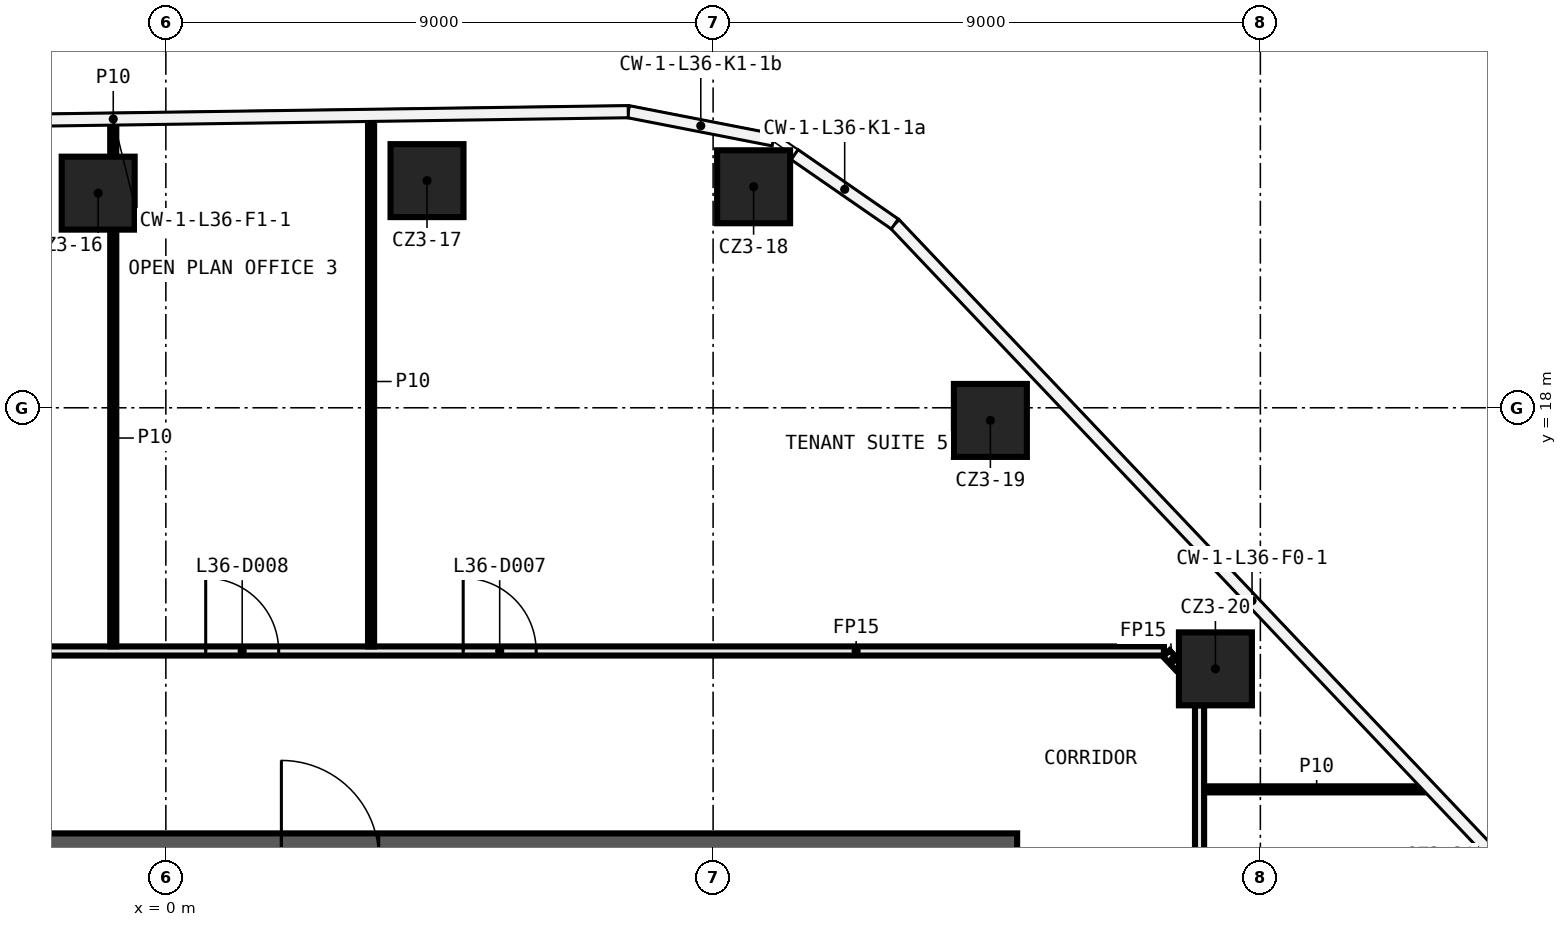
"""IFC4 building model, lengths in metres.
Left out: names, types, materials, properties, quantities, classifications, styles, units other than length and angle.
Written with IfcOpenShell. Run it as: python <this file> out.ifc"""

import sys

from ifc_helpers import new_model, si_unit, direction, frame, frame_2d, origin, origin_2d, place, context, subcontext, project, spatial, rectangle, extrude, element, fill, save


model = new_model("IFC4")
c1 = context("Model", 3, precision=1e-05, world=origin(), true_north=direction((0.0, 1.0)))
c2 = subcontext(c1, "Body", "Model", "MODEL_VIEW")
j1 = project(units=[si_unit("LENGTHUNIT", "METRE"), si_unit("PLANEANGLEUNIT", "RADIAN")], contexts=[c1])
p1 = place(None, origin())
s1 = spatial("IfcSite", under=j1, at=p1, CompositionType="ELEMENT")
p2 = place(p1, origin())
s2 = spatial("IfcBuilding", under=s1, at=p2, CompositionType="ELEMENT")
p3 = place(p2, frame((0.0, 0.0, 167.0)))
s3 = spatial("IfcBuildingStorey", under=s2, at=p3, CompositionType="ELEMENT", Elevation=167.0)
for number, where, z_axis, x_axis in (
    (1, (-1.113, 21.53, 0.0), (0.0, 0.0, 1.0), (1.0, 0.0, 0.0)),
    (2, (4.295, 21.736, 0.0), (0.0, 0.0, 1.0), (1.0, 0.0, 0.0)),
    (3, (9.666, 21.635, 0.0), (0.0, 0.0, 1.0), (1.0, 0.0, 0.0)),
    (4, (13.56, 17.792, 0.0), (0.0, 0.0, 1.0), (1.0, 0.0, 0.0)),
    (5, (17.261, 13.706, 0.0), (0.0, 0.0, 1.0), (1.0, 0.0, 0.0)),
):
    element("IfcColumn", number, at=place(p3, frame(where, z_axis=z_axis, x_axis=x_axis)), inside=s3, PredefinedType="COLUMN", context=c2, shape_type="SweptSolid", body=[
        extrude(rectangle(XDim=1.2, YDim=1.2, at=origin_2d()), origin(), (0.0, 0.0, 1.0), 3.82),
    ])
p4 = place(p3, frame((17.075, 11.724, 0.0), z_axis=(0.0, 0.0, 1.0), x_axis=(1.0, 0.0, 0.0)))
e6 = element("IfcWall", 6, at=p4, inside=s3, PredefinedType="PARTITIONING", context=c2, shape_type="SweptSolid", body=[
    extrude(rectangle(XDim=3.701, YDim=0.1, at=frame_2d((1.851, 0.0))), origin(), (0.0, 0.0, 1.0), 3.82),
])
p5 = place(p3, frame((-9.075, 14.0, 0.0), z_axis=(0.0, 0.0, 1.0), x_axis=(1.0, 0.0, 0.0)))
e7 = element("IfcWall", 7, at=p5, inside=s3, PredefinedType="PARTITIONING", context=c2, shape_type="SweptSolid", body=[
    extrude(rectangle(XDim=25.489, YDim=0.15, at=frame_2d((12.745, 0.0))), origin(), (0.0, 0.0, 1.0), 3.82),
])
p6 = place(p5, frame((13.965, 0.0, 0.0)))
e8 = element("IfcOpeningElement", 8, at=p6, cuts=e7, PredefinedType="OPENING", context=c2, shape_type="SweptSolid", body=[
    extrude(rectangle(XDim=1.2, YDim=2.1, at=frame_2d((0.6, 1.05))), frame((0.0, 0.085, 0.0), z_axis=(0.0, -1.0, 0.0), x_axis=(1.0, 0.0, 0.0)), (0.0, 0.0, 1.0), 0.17),
])
p7 = place(p5, frame((9.73, 0.0, 0.0)))
e9 = element("IfcOpeningElement", 9, at=p7, cuts=e7, PredefinedType="OPENING", context=c2, shape_type="SweptSolid", body=[
    extrude(rectangle(XDim=1.2, YDim=2.1, at=frame_2d((0.6, 1.05))), frame((0.0, 0.085, 0.0), z_axis=(0.0, -1.0, 0.0), x_axis=(1.0, 0.0, 0.0)), (0.0, 0.0, 1.0), 0.17),
])
p8 = place(p5, frame((5.49, 0.0, 0.0)))
e10 = element("IfcOpeningElement", 10, at=p8, cuts=e7, PredefinedType="OPENING", context=c2, shape_type="SweptSolid", body=[
    extrude(rectangle(XDim=1.2, YDim=2.1, at=frame_2d((0.6, 1.05))), frame((0.0, 0.085, 0.0), z_axis=(0.0, -1.0, 0.0), x_axis=(1.0, 0.0, 0.0)), (0.0, 0.0, 1.0), 0.17),
])
p9 = place(p3, frame((17.0, 13.106, 0.0), z_axis=(0.0, 0.0, 1.0), x_axis=(0.0, -1.0, 0.0)))
e11 = element("IfcWall", 11, at=p9, inside=s3, PredefinedType="PARTITIONING", context=c2, shape_type="SweptSolid", body=[
    extrude(rectangle(XDim=23.172, YDim=0.15, at=frame_2d((11.586, 0.0))), origin(), (0.0, 0.0, 1.0), 3.82),
])
p10 = place(p9, frame((11.492, 0.0, 0.0)))
e12 = element("IfcOpeningElement", 12, at=p10, cuts=e11, PredefinedType="OPENING", context=c2, shape_type="SweptSolid", body=[
    extrude(rectangle(XDim=1.2, YDim=2.1, at=frame_2d((0.6, 1.05))), frame((0.0, 0.085, 0.0), z_axis=(0.0, -1.0, 0.0), x_axis=(1.0, 0.0, 0.0)), (0.0, 0.0, 1.0), 0.17),
])
p11 = place(p9, frame((6.056, 0.0, 0.0)))
e13 = element("IfcOpeningElement", 13, at=p11, cuts=e11, PredefinedType="OPENING", context=c2, shape_type="SweptSolid", body=[
    extrude(rectangle(XDim=1.2, YDim=2.1, at=frame_2d((0.6, 1.05))), frame((0.0, 0.085, 0.0), z_axis=(0.0, -1.0, 0.0), x_axis=(1.0, 0.0, 0.0)), (0.0, 0.0, 1.0), 0.17),
])
p12 = place(p3, frame((3.375, 14.075, 0.0), z_axis=(0.0, 0.0, 1.0), x_axis=(0.0, 1.0, 0.0)))
e14 = element("IfcWall", 14, at=p12, inside=s3, PredefinedType="PARTITIONING", context=c2, shape_type="SweptSolid", body=[
    extrude(rectangle(XDim=8.715, YDim=0.1, at=frame_2d((4.357, 0.0))), origin(), (0.0, 0.0, 1.0), 3.82),
])
p13 = place(p3, frame((-0.865, 14.075, 0.0), z_axis=(0.0, 0.0, 1.0), x_axis=(0.0, 1.0, 0.0)))
e15 = element("IfcWall", 15, at=p13, inside=s3, PredefinedType="PARTITIONING", context=c2, shape_type="SweptSolid", body=[
    extrude(rectangle(XDim=6.855, YDim=0.1, at=frame_2d((3.427, 0.0))), origin(), (0.0, 0.0, 1.0), 3.82),
])
p14 = place(p3, frame((-0.865, 22.13, 0.0), z_axis=(0.0, 0.0, 1.0), x_axis=(0.0, 1.0, 0.0)))
e16 = element("IfcWall", 16, at=p14, inside=s3, PredefinedType="PARTITIONING", context=c2, shape_type="SweptSolid", body=[
    extrude(rectangle(XDim=0.599, YDim=0.1, at=frame_2d((0.3, 0.0))), origin(), (0.0, 0.0, 1.0), 3.82),
])
p15 = place(p3, frame((16.453, 13.959, 0.0), z_axis=(0.0, 0.0, 1.0), x_axis=(0.687856738642, -0.725846476264, 0.0)))
e17 = element("IfcWall", 17, at=p15, inside=s3, PredefinedType="PARTITIONING", context=c2, shape_type="SweptSolid", body=[
    extrude(rectangle(XDim=0.302, YDim=0.15, at=frame_2d((0.151, 0.0))), origin(), (0.0, 0.0, 1.0), 3.82),
])
p16 = place(p3, frame((-14.0, 10.6, 0.0), z_axis=(0.0, 0.0, 1.0), x_axis=(1.0, 0.0, 0.0)))
e18 = element("IfcWall", 18, at=p16, inside=s3, PredefinedType="SHEAR", context=c2, shape_type="SweptSolid", body=[
    extrude(rectangle(XDim=28.0, YDim=0.8, at=frame_2d((14.0, 0.0))), origin(), (0.0, 0.0, 1.0), 3.82),
])
p17 = place(p16, frame((15.9, 0.0, 0.0)))
e19 = element("IfcOpeningElement", 19, at=p17, cuts=e18, PredefinedType="OPENING", context=c2, shape_type="SweptSolid", body=[
    extrude(rectangle(XDim=1.6, YDim=2.1, at=frame_2d((0.8, 1.05))), frame((0.0, 0.41, 0.0), z_axis=(0.0, -1.0, 0.0), x_axis=(1.0, 0.0, 0.0)), (0.0, 0.0, 1.0), 0.82),
])
p18 = place(p6, origin())
e20 = element("IfcDoor", 20, at=p18, inside=s3, OperationType="SINGLE_SWING_RIGHT", PredefinedType="DOOR", context=c2, shape_type="SweptSolid", body=[
    extrude(rectangle(XDim=1.2, YDim=2.1, at=frame_2d((0.6, 1.05))), frame((0.0, 0.025, 0.0), z_axis=(0.0, -1.0, 0.0), x_axis=(1.0, 0.0, 0.0)), (0.0, 0.0, 1.0), 0.05),
])
fill(e8, e20)
p19 = place(p7, origin())
e21 = element("IfcDoor", 21, at=p19, inside=s3, OperationType="SINGLE_SWING_LEFT", PredefinedType="DOOR", context=c2, shape_type="SweptSolid", body=[
    extrude(rectangle(XDim=1.2, YDim=2.1, at=frame_2d((0.6, 1.05))), frame((0.0, 0.025, 0.0), z_axis=(0.0, -1.0, 0.0), x_axis=(1.0, 0.0, 0.0)), (0.0, 0.0, 1.0), 0.05),
])
fill(e9, e21)
save(model, sys.argv[1])
